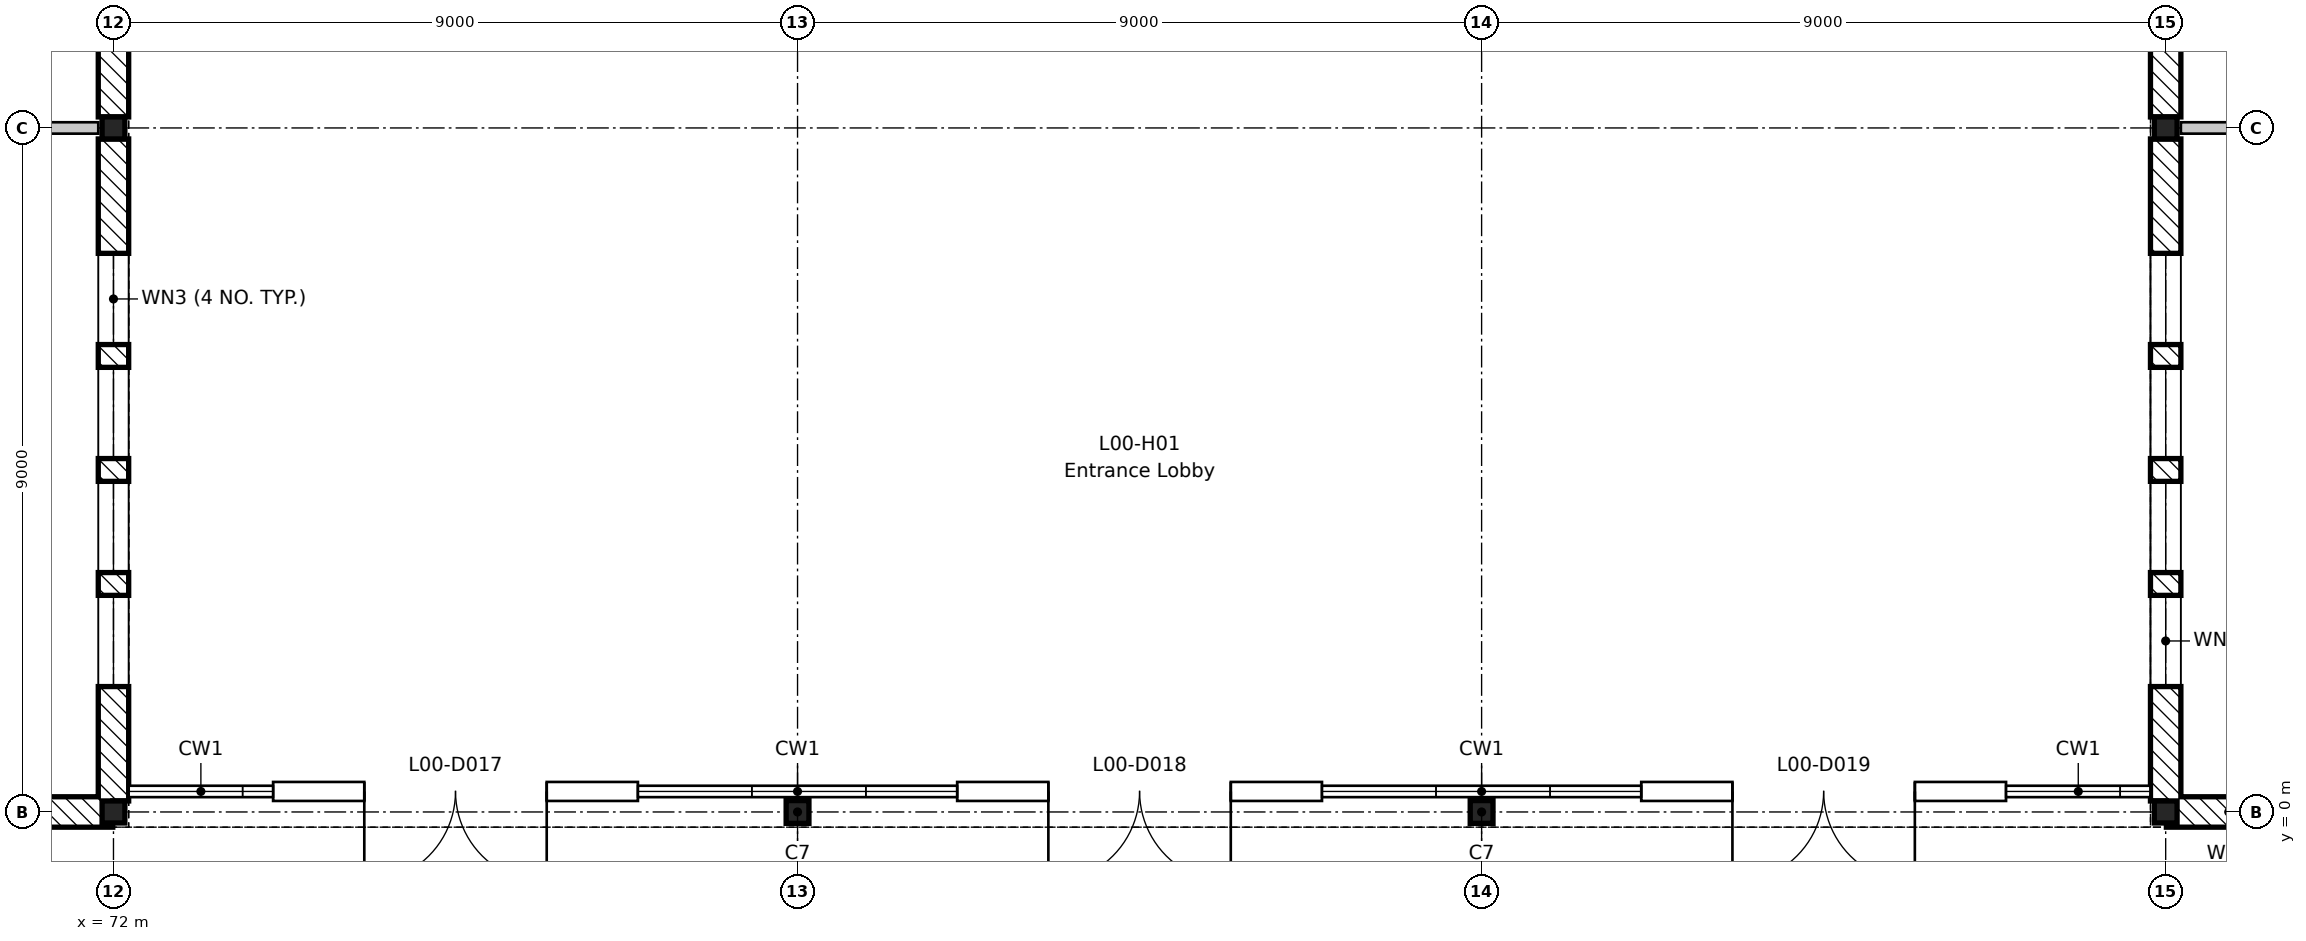
"""IFC4 building model, lengths in metres.
Left out: names, types, materials, properties, quantities, classifications, styles, units other than length and angle.
Written with IfcOpenShell. Run it as: python <this file> out.ifc"""

import sys

from ifc_helpers import new_model, si_unit, direction, frame, frame_2d, origin, origin_2d, place, context, subcontext, project, spatial, rectangle, hollow_rectangle, i_section, extrude, element, fill, save


model = new_model("IFC4")
c1 = context("Model", 3, precision=1e-05, world=origin(), true_north=direction((0.0, 1.0)))
c2 = subcontext(c1, "Body", "Model", "MODEL_VIEW")
j1 = project(units=[si_unit("LENGTHUNIT", "METRE"), si_unit("PLANEANGLEUNIT", "RADIAN")], contexts=[c1])
p1 = place(None, origin())
s1 = spatial("IfcSite", under=j1, at=p1, CompositionType="ELEMENT")
p2 = place(p1, origin())
s2 = spatial("IfcBuilding", under=s1, at=p2, CompositionType="ELEMENT")
p3 = place(p2, origin())
s3 = spatial("IfcBuildingStorey", under=s2, at=p3, CompositionType="ELEMENT", Elevation=0.0)
for number, where, z_axis, x_axis in (
    (1, (72.0, 0.0, -0.6), (0.0, 0.0, 1.0), (1.0, 0.0, 0.0)),
    (2, (72.0, 9.0, -0.6), (0.0, 0.0, 1.0), (1.0, 0.0, 0.0)),
    (3, (99.0, 0.0, -0.6), (0.0, 0.0, 1.0), (1.0, 0.0, 0.0)),
    (4, (99.0, 9.0, -0.6), (0.0, 0.0, 1.0), (1.0, 0.0, 0.0)),
):
    element("IfcColumn", number, at=place(p3, frame(where, z_axis=z_axis, x_axis=x_axis)), inside=s3, PredefinedType="COLUMN", context=c2, shape_type="SweptSolid", body=[
        extrude(i_section(OverallWidth=0.3, OverallDepth=0.29, WebThickness=0.009, FlangeThickness=0.014, FilletRadius=0.027, at=origin_2d()), origin(), (0.0, 0.0, 1.0), 5.8),
    ])
for number, where, z_axis, x_axis in (
    (5, (81.0, 0.0, -0.6), (0.0, 0.0, 1.0), (1.0, 0.0, 0.0)),
    (6, (90.0, 0.0, -0.6), (0.0, 0.0, 1.0), (1.0, 0.0, 0.0)),
):
    element("IfcColumn", number, at=place(p3, frame(where, z_axis=z_axis, x_axis=x_axis)), inside=s3, PredefinedType="COLUMN", context=c2, shape_type="SweptSolid", body=[
        extrude(hollow_rectangle(XDim=0.3, YDim=0.3, WallThickness=0.016, at=origin_2d()), origin(), (0.0, 0.0, 1.0), 5.4),
    ])
p4 = place(p3, frame((72.0, 8.855, 0.0), z_axis=(0.0, 0.0, 1.0), x_axis=(0.0, -1.0, 0.0)))
e7 = element("IfcWall", 7, at=p4, inside=s3, PredefinedType="STANDARD", context=c2, shape_type="SweptSolid", body=[
    extrude(rectangle(XDim=8.71, YDim=0.4, at=frame_2d((4.355, 0.0))), origin(), (0.0, 0.0, 1.0), 4.8),
])
p5 = place(p4, frame((6.005, 0.0, 0.6)))
e8 = element("IfcOpeningElement", 8, at=p5, cuts=e7, PredefinedType="OPENING", context=c2, shape_type="SweptSolid", body=[
    extrude(rectangle(XDim=1.2, YDim=3.9, at=frame_2d((0.6, 1.95))), frame((0.0, 0.21, 0.0), z_axis=(0.0, -1.0, 0.0), x_axis=(1.0, 0.0, 0.0)), (0.0, 0.0, 1.0), 0.42),
])
p6 = place(p4, frame((4.505, 0.0, 0.6)))
e9 = element("IfcOpeningElement", 9, at=p6, cuts=e7, PredefinedType="OPENING", context=c2, shape_type="SweptSolid", body=[
    extrude(rectangle(XDim=1.2, YDim=3.9, at=frame_2d((0.6, 1.95))), frame((0.0, 0.21, 0.0), z_axis=(0.0, -1.0, 0.0), x_axis=(1.0, 0.0, 0.0)), (0.0, 0.0, 1.0), 0.42),
])
p7 = place(p4, frame((3.005, 0.0, 0.6)))
e10 = element("IfcOpeningElement", 10, at=p7, cuts=e7, PredefinedType="OPENING", context=c2, shape_type="SweptSolid", body=[
    extrude(rectangle(XDim=1.2, YDim=3.9, at=frame_2d((0.6, 1.95))), frame((0.0, 0.21, 0.0), z_axis=(0.0, -1.0, 0.0), x_axis=(1.0, 0.0, 0.0)), (0.0, 0.0, 1.0), 0.42),
])
p8 = place(p4, frame((1.505, 0.0, 0.6)))
e11 = element("IfcOpeningElement", 11, at=p8, cuts=e7, PredefinedType="OPENING", context=c2, shape_type="SweptSolid", body=[
    extrude(rectangle(XDim=1.2, YDim=3.9, at=frame_2d((0.6, 1.95))), frame((0.0, 0.21, 0.0), z_axis=(0.0, -1.0, 0.0), x_axis=(1.0, 0.0, 0.0)), (0.0, 0.0, 1.0), 0.42),
])
p9 = place(p3, frame((72.0, 17.855, 0.0), z_axis=(0.0, 0.0, 1.0), x_axis=(0.0, -1.0, 0.0)))
e12 = element("IfcWall", 12, at=p9, inside=s3, PredefinedType="STANDARD", context=c2, shape_type="SweptSolid", body=[
    extrude(rectangle(XDim=8.71, YDim=0.4, at=frame_2d((4.355, 0.0))), origin(), (0.0, 0.0, 1.0), 4.8),
])
p10 = place(p9, frame((6.005, 0.0, 0.6)))
e13 = element("IfcOpeningElement", 13, at=p10, cuts=e12, PredefinedType="OPENING", context=c2, shape_type="SweptSolid", body=[
    extrude(rectangle(XDim=1.2, YDim=3.9, at=frame_2d((0.6, 1.95))), frame((0.0, 0.21, 0.0), z_axis=(0.0, -1.0, 0.0), x_axis=(1.0, 0.0, 0.0)), (0.0, 0.0, 1.0), 0.42),
])
p11 = place(p9, frame((4.505, 0.0, 0.6)))
e14 = element("IfcOpeningElement", 14, at=p11, cuts=e12, PredefinedType="OPENING", context=c2, shape_type="SweptSolid", body=[
    extrude(rectangle(XDim=1.2, YDim=3.9, at=frame_2d((0.6, 1.95))), frame((0.0, 0.21, 0.0), z_axis=(0.0, -1.0, 0.0), x_axis=(1.0, 0.0, 0.0)), (0.0, 0.0, 1.0), 0.42),
])
p12 = place(p9, frame((3.005, 0.0, 0.6)))
e15 = element("IfcOpeningElement", 15, at=p12, cuts=e12, PredefinedType="OPENING", context=c2, shape_type="SweptSolid", body=[
    extrude(rectangle(XDim=1.2, YDim=3.9, at=frame_2d((0.6, 1.95))), frame((0.0, 0.21, 0.0), z_axis=(0.0, -1.0, 0.0), x_axis=(1.0, 0.0, 0.0)), (0.0, 0.0, 1.0), 0.42),
])
p13 = place(p9, frame((1.505, 0.0, 0.6)))
e16 = element("IfcOpeningElement", 16, at=p13, cuts=e12, PredefinedType="OPENING", context=c2, shape_type="SweptSolid", body=[
    extrude(rectangle(XDim=1.2, YDim=3.9, at=frame_2d((0.6, 1.95))), frame((0.0, 0.21, 0.0), z_axis=(0.0, -1.0, 0.0), x_axis=(1.0, 0.0, 0.0)), (0.0, 0.0, 1.0), 0.42),
])
p14 = place(p3, frame((71.991, 0.0, 0.0), z_axis=(0.0, 0.0, 1.0), x_axis=(-1.0, 0.0, 0.0)))
e17 = element("IfcWall", 17, at=p14, inside=s3, PredefinedType="STANDARD", context=c2, shape_type="SweptSolid", body=[
    extrude(rectangle(XDim=7.481, YDim=0.4, at=frame_2d((3.741, 0.0))), origin(), (0.0, 0.0, 1.0), 4.87),
])
p15 = place(p14, frame((4.641, 0.0, 0.6)))
e18 = element("IfcOpeningElement", 18, at=p15, cuts=e17, PredefinedType="OPENING", context=c2, shape_type="SweptSolid", body=[
    extrude(rectangle(XDim=1.2, YDim=3.9, at=frame_2d((0.6, 1.95))), frame((0.0, 0.21, 0.0), z_axis=(0.0, -1.0, 0.0), x_axis=(1.0, 0.0, 0.0)), (0.0, 0.0, 1.0), 0.42),
])
p16 = place(p14, frame((3.141, 0.0, 0.6)))
e19 = element("IfcOpeningElement", 19, at=p16, cuts=e17, PredefinedType="OPENING", context=c2, shape_type="SweptSolid", body=[
    extrude(rectangle(XDim=1.2, YDim=3.9, at=frame_2d((0.6, 1.95))), frame((0.0, 0.21, 0.0), z_axis=(0.0, -1.0, 0.0), x_axis=(1.0, 0.0, 0.0)), (0.0, 0.0, 1.0), 0.42),
])
p17 = place(p14, frame((1.641, 0.0, 0.6)))
e20 = element("IfcOpeningElement", 20, at=p17, cuts=e17, PredefinedType="OPENING", context=c2, shape_type="SweptSolid", body=[
    extrude(rectangle(XDim=1.2, YDim=3.9, at=frame_2d((0.6, 1.95))), frame((0.0, 0.21, 0.0), z_axis=(0.0, -1.0, 0.0), x_axis=(1.0, 0.0, 0.0)), (0.0, 0.0, 1.0), 0.42),
])
p18 = place(p3, frame((99.0, 0.145, 0.0), z_axis=(0.0, 0.0, 1.0), x_axis=(0.0, 1.0, 0.0)))
e21 = element("IfcWall", 21, at=p18, inside=s3, PredefinedType="STANDARD", context=c2, shape_type="SweptSolid", body=[
    extrude(rectangle(XDim=8.71, YDim=0.4, at=frame_2d((4.355, 0.0))), origin(), (0.0, 0.0, 1.0), 4.8),
])
p19 = place(p18, frame((1.505, 0.0, 0.6)))
e22 = element("IfcOpeningElement", 22, at=p19, cuts=e21, PredefinedType="OPENING", context=c2, shape_type="SweptSolid", body=[
    extrude(rectangle(XDim=1.2, YDim=3.9, at=frame_2d((0.6, 1.95))), frame((0.0, 0.21, 0.0), z_axis=(0.0, -1.0, 0.0), x_axis=(1.0, 0.0, 0.0)), (0.0, 0.0, 1.0), 0.42),
])
p20 = place(p18, frame((3.005, 0.0, 0.6)))
e23 = element("IfcOpeningElement", 23, at=p20, cuts=e21, PredefinedType="OPENING", context=c2, shape_type="SweptSolid", body=[
    extrude(rectangle(XDim=1.2, YDim=3.9, at=frame_2d((0.6, 1.95))), frame((0.0, 0.21, 0.0), z_axis=(0.0, -1.0, 0.0), x_axis=(1.0, 0.0, 0.0)), (0.0, 0.0, 1.0), 0.42),
])
p21 = place(p18, frame((4.505, 0.0, 0.6)))
e24 = element("IfcOpeningElement", 24, at=p21, cuts=e21, PredefinedType="OPENING", context=c2, shape_type="SweptSolid", body=[
    extrude(rectangle(XDim=1.2, YDim=3.9, at=frame_2d((0.6, 1.95))), frame((0.0, 0.21, 0.0), z_axis=(0.0, -1.0, 0.0), x_axis=(1.0, 0.0, 0.0)), (0.0, 0.0, 1.0), 0.42),
])
p22 = place(p18, frame((6.005, 0.0, 0.6)))
e25 = element("IfcOpeningElement", 25, at=p22, cuts=e21, PredefinedType="OPENING", context=c2, shape_type="SweptSolid", body=[
    extrude(rectangle(XDim=1.2, YDim=3.9, at=frame_2d((0.6, 1.95))), frame((0.0, 0.21, 0.0), z_axis=(0.0, -1.0, 0.0), x_axis=(1.0, 0.0, 0.0)), (0.0, 0.0, 1.0), 0.42),
])
p23 = place(p3, frame((99.0, 9.145, 0.0), z_axis=(0.0, 0.0, 1.0), x_axis=(0.0, 1.0, 0.0)))
e26 = element("IfcWall", 26, at=p23, inside=s3, PredefinedType="STANDARD", context=c2, shape_type="SweptSolid", body=[
    extrude(rectangle(XDim=8.71, YDim=0.4, at=frame_2d((4.355, 0.0))), origin(), (0.0, 0.0, 1.0), 4.8),
])
p24 = place(p23, frame((1.505, 0.0, 0.6)))
e27 = element("IfcOpeningElement", 27, at=p24, cuts=e26, PredefinedType="OPENING", context=c2, shape_type="SweptSolid", body=[
    extrude(rectangle(XDim=1.2, YDim=3.9, at=frame_2d((0.6, 1.95))), frame((0.0, 0.21, 0.0), z_axis=(0.0, -1.0, 0.0), x_axis=(1.0, 0.0, 0.0)), (0.0, 0.0, 1.0), 0.42),
])
p25 = place(p23, frame((3.005, 0.0, 0.6)))
e28 = element("IfcOpeningElement", 28, at=p25, cuts=e26, PredefinedType="OPENING", context=c2, shape_type="SweptSolid", body=[
    extrude(rectangle(XDim=1.2, YDim=3.9, at=frame_2d((0.6, 1.95))), frame((0.0, 0.21, 0.0), z_axis=(0.0, -1.0, 0.0), x_axis=(1.0, 0.0, 0.0)), (0.0, 0.0, 1.0), 0.42),
])
p26 = place(p23, frame((4.505, 0.0, 0.6)))
e29 = element("IfcOpeningElement", 29, at=p26, cuts=e26, PredefinedType="OPENING", context=c2, shape_type="SweptSolid", body=[
    extrude(rectangle(XDim=1.2, YDim=3.9, at=frame_2d((0.6, 1.95))), frame((0.0, 0.21, 0.0), z_axis=(0.0, -1.0, 0.0), x_axis=(1.0, 0.0, 0.0)), (0.0, 0.0, 1.0), 0.42),
])
p27 = place(p23, frame((6.005, 0.0, 0.6)))
e30 = element("IfcOpeningElement", 30, at=p27, cuts=e26, PredefinedType="OPENING", context=c2, shape_type="SweptSolid", body=[
    extrude(rectangle(XDim=1.2, YDim=3.9, at=frame_2d((0.6, 1.95))), frame((0.0, 0.21, 0.0), z_axis=(0.0, -1.0, 0.0), x_axis=(1.0, 0.0, 0.0)), (0.0, 0.0, 1.0), 0.42),
])
p28 = place(p3, frame((106.491, 0.0, 0.0), z_axis=(0.0, 0.0, 1.0), x_axis=(-1.0, 0.0, 0.0)))
e31 = element("IfcWall", 31, at=p28, inside=s3, PredefinedType="STANDARD", context=c2, shape_type="SweptSolid", body=[
    extrude(rectangle(XDim=7.481, YDim=0.4, at=frame_2d((3.741, 0.0))), origin(), (0.0, 0.0, 1.0), 4.87),
])
p29 = place(p28, frame((4.641, 0.0, 0.6)))
e32 = element("IfcOpeningElement", 32, at=p29, cuts=e31, PredefinedType="OPENING", context=c2, shape_type="SweptSolid", body=[
    extrude(rectangle(XDim=1.2, YDim=3.9, at=frame_2d((0.6, 1.95))), frame((0.0, 0.21, 0.0), z_axis=(0.0, -1.0, 0.0), x_axis=(1.0, 0.0, 0.0)), (0.0, 0.0, 1.0), 0.42),
])
p30 = place(p28, frame((3.141, 0.0, 0.6)))
e33 = element("IfcOpeningElement", 33, at=p30, cuts=e31, PredefinedType="OPENING", context=c2, shape_type="SweptSolid", body=[
    extrude(rectangle(XDim=1.2, YDim=3.9, at=frame_2d((0.6, 1.95))), frame((0.0, 0.21, 0.0), z_axis=(0.0, -1.0, 0.0), x_axis=(1.0, 0.0, 0.0)), (0.0, 0.0, 1.0), 0.42),
])
p31 = place(p28, frame((1.641, 0.0, 0.6)))
e34 = element("IfcOpeningElement", 34, at=p31, cuts=e31, PredefinedType="OPENING", context=c2, shape_type="SweptSolid", body=[
    extrude(rectangle(XDim=1.2, YDim=3.9, at=frame_2d((0.6, 1.95))), frame((0.0, 0.21, 0.0), z_axis=(0.0, -1.0, 0.0), x_axis=(1.0, 0.0, 0.0)), (0.0, 0.0, 1.0), 0.42),
])
p32 = place(p3, frame((78.9, 0.27, 0.0), z_axis=(0.0, 0.0, 1.0), x_axis=(-1.0, 0.0, 0.0)))
e35 = element("IfcWall", 35, at=p32, inside=s3, PredefinedType="STANDARD", context=c2, shape_type="SweptSolid", body=[
    extrude(rectangle(XDim=4.8, YDim=0.25, at=frame_2d((2.4, 0.0))), origin(), (0.0, 0.0, 1.0), 4.8),
])
p33 = place(p32, frame((1.2, 0.0, 0.0)))
e36 = element("IfcOpeningElement", 36, at=p33, cuts=e35, PredefinedType="OPENING", context=c2, shape_type="SweptSolid", body=[
    extrude(rectangle(XDim=2.4, YDim=2.4, at=frame_2d((1.2, 1.2))), frame((0.0, 0.135, 0.0), z_axis=(0.0, -1.0, 0.0), x_axis=(1.0, 0.0, 0.0)), (0.0, 0.0, 1.0), 0.27),
])
p34 = place(p3, frame((87.9, 0.27, 0.0), z_axis=(0.0, 0.0, 1.0), x_axis=(-1.0, 0.0, 0.0)))
e37 = element("IfcWall", 37, at=p34, inside=s3, PredefinedType="STANDARD", context=c2, shape_type="SweptSolid", body=[
    extrude(rectangle(XDim=4.8, YDim=0.25, at=frame_2d((2.4, 0.0))), origin(), (0.0, 0.0, 1.0), 4.8),
])
p35 = place(p34, frame((1.2, 0.0, 0.0)))
e38 = element("IfcOpeningElement", 38, at=p35, cuts=e37, PredefinedType="OPENING", context=c2, shape_type="SweptSolid", body=[
    extrude(rectangle(XDim=2.4, YDim=2.4, at=frame_2d((1.2, 1.2))), frame((0.0, 0.135, 0.0), z_axis=(0.0, -1.0, 0.0), x_axis=(1.0, 0.0, 0.0)), (0.0, 0.0, 1.0), 0.27),
])
p36 = place(p3, frame((96.9, 0.27, 0.0), z_axis=(0.0, 0.0, 1.0), x_axis=(-1.0, 0.0, 0.0)))
e39 = element("IfcWall", 39, at=p36, inside=s3, PredefinedType="STANDARD", context=c2, shape_type="SweptSolid", body=[
    extrude(rectangle(XDim=4.8, YDim=0.25, at=frame_2d((2.4, 0.0))), origin(), (0.0, 0.0, 1.0), 4.8),
])
p37 = place(p36, frame((1.2, 0.0, 0.0)))
e40 = element("IfcOpeningElement", 40, at=p37, cuts=e39, PredefinedType="OPENING", context=c2, shape_type="SweptSolid", body=[
    extrude(rectangle(XDim=2.4, YDim=2.4, at=frame_2d((1.2, 1.2))), frame((0.0, 0.135, 0.0), z_axis=(0.0, -1.0, 0.0), x_axis=(1.0, 0.0, 0.0)), (0.0, 0.0, 1.0), 0.27),
])
for number, where, z_axis, x_axis in (
    (41, (64.575, 9.0, 0.0), (0.0, 0.0, 1.0), (1.0, 0.0, 0.0)),
    (42, (99.2, 9.0, 0.0), (0.0, 0.0, 1.0), (1.0, 0.0, 0.0)),
):
    element("IfcWall", number, at=place(p3, frame(where, z_axis=z_axis, x_axis=x_axis)), inside=s3, PredefinedType="PARTITIONING", context=c2, shape_type="SweptSolid", body=[
        extrude(rectangle(XDim=7.225, YDim=0.15, at=frame_2d((3.613, 0.0))), origin(), (0.0, 0.0, 1.0), 4.85),
    ])
p38 = place(p5, origin())
e43 = element("IfcWindow", 43, at=p38, inside=s3, PartitioningType="SINGLE_PANEL", PredefinedType="WINDOW", context=c2, shape_type="SweptSolid", body=[
    extrude(rectangle(XDim=1.2, YDim=3.9, at=frame_2d((0.6, 1.95))), frame((0.0, 0.03, 0.0), z_axis=(0.0, -1.0, 0.0), x_axis=(1.0, 0.0, 0.0)), (0.0, 0.0, 1.0), 0.06),
])
fill(e8, e43)
p39 = place(p6, origin())
e44 = element("IfcWindow", 44, at=p39, inside=s3, PartitioningType="SINGLE_PANEL", PredefinedType="WINDOW", context=c2, shape_type="SweptSolid", body=[
    extrude(rectangle(XDim=1.2, YDim=3.9, at=frame_2d((0.6, 1.95))), frame((0.0, 0.03, 0.0), z_axis=(0.0, -1.0, 0.0), x_axis=(1.0, 0.0, 0.0)), (0.0, 0.0, 1.0), 0.06),
])
fill(e9, e44)
p40 = place(p7, origin())
e45 = element("IfcWindow", 45, at=p40, inside=s3, PartitioningType="SINGLE_PANEL", PredefinedType="WINDOW", context=c2, shape_type="SweptSolid", body=[
    extrude(rectangle(XDim=1.2, YDim=3.9, at=frame_2d((0.6, 1.95))), frame((0.0, 0.03, 0.0), z_axis=(0.0, -1.0, 0.0), x_axis=(1.0, 0.0, 0.0)), (0.0, 0.0, 1.0), 0.06),
])
fill(e10, e45)
p41 = place(p8, origin())
e46 = element("IfcWindow", 46, at=p41, inside=s3, PartitioningType="SINGLE_PANEL", PredefinedType="WINDOW", context=c2, shape_type="SweptSolid", body=[
    extrude(rectangle(XDim=1.2, YDim=3.9, at=frame_2d((0.6, 1.95))), frame((0.0, 0.03, 0.0), z_axis=(0.0, -1.0, 0.0), x_axis=(1.0, 0.0, 0.0)), (0.0, 0.0, 1.0), 0.06),
])
fill(e11, e46)
p42 = place(p19, origin())
e47 = element("IfcWindow", 47, at=p42, inside=s3, PartitioningType="SINGLE_PANEL", PredefinedType="WINDOW", context=c2, shape_type="SweptSolid", body=[
    extrude(rectangle(XDim=1.2, YDim=3.9, at=frame_2d((0.6, 1.95))), frame((0.0, 0.03, 0.0), z_axis=(0.0, -1.0, 0.0), x_axis=(1.0, 0.0, 0.0)), (0.0, 0.0, 1.0), 0.06),
])
fill(e22, e47)
p43 = place(p20, origin())
e48 = element("IfcWindow", 48, at=p43, inside=s3, PartitioningType="SINGLE_PANEL", PredefinedType="WINDOW", context=c2, shape_type="SweptSolid", body=[
    extrude(rectangle(XDim=1.2, YDim=3.9, at=frame_2d((0.6, 1.95))), frame((0.0, 0.03, 0.0), z_axis=(0.0, -1.0, 0.0), x_axis=(1.0, 0.0, 0.0)), (0.0, 0.0, 1.0), 0.06),
])
fill(e23, e48)
p44 = place(p21, origin())
e49 = element("IfcWindow", 49, at=p44, inside=s3, PartitioningType="SINGLE_PANEL", PredefinedType="WINDOW", context=c2, shape_type="SweptSolid", body=[
    extrude(rectangle(XDim=1.2, YDim=3.9, at=frame_2d((0.6, 1.95))), frame((0.0, 0.03, 0.0), z_axis=(0.0, -1.0, 0.0), x_axis=(1.0, 0.0, 0.0)), (0.0, 0.0, 1.0), 0.06),
])
fill(e24, e49)
p45 = place(p22, origin())
e50 = element("IfcWindow", 50, at=p45, inside=s3, PartitioningType="SINGLE_PANEL", PredefinedType="WINDOW", context=c2, shape_type="SweptSolid", body=[
    extrude(rectangle(XDim=1.2, YDim=3.9, at=frame_2d((0.6, 1.95))), frame((0.0, 0.03, 0.0), z_axis=(0.0, -1.0, 0.0), x_axis=(1.0, 0.0, 0.0)), (0.0, 0.0, 1.0), 0.06),
])
fill(e25, e50)
p46 = place(p33, origin())
e51 = element("IfcDoor", 51, at=p46, inside=s3, OperationType="DOUBLE_DOOR_SINGLE_SWING", PredefinedType="DOOR", context=c2, shape_type="SweptSolid", body=[
    extrude(rectangle(XDim=2.4, YDim=2.4, at=frame_2d((1.2, 1.2))), frame((0.0, 0.025, 0.0), z_axis=(0.0, -1.0, 0.0), x_axis=(1.0, 0.0, 0.0)), (0.0, 0.0, 1.0), 0.05),
])
fill(e36, e51)
p47 = place(p35, origin())
e52 = element("IfcDoor", 52, at=p47, inside=s3, OperationType="DOUBLE_DOOR_SINGLE_SWING", PredefinedType="DOOR", context=c2, shape_type="SweptSolid", body=[
    extrude(rectangle(XDim=2.4, YDim=2.4, at=frame_2d((1.2, 1.2))), frame((0.0, 0.025, 0.0), z_axis=(0.0, -1.0, 0.0), x_axis=(1.0, 0.0, 0.0)), (0.0, 0.0, 1.0), 0.05),
])
fill(e38, e52)
p48 = place(p37, origin())
e53 = element("IfcDoor", 53, at=p48, inside=s3, OperationType="DOUBLE_DOOR_SINGLE_SWING", PredefinedType="DOOR", context=c2, shape_type="SweptSolid", body=[
    extrude(rectangle(XDim=2.4, YDim=2.4, at=frame_2d((1.2, 1.2))), frame((0.0, 0.025, 0.0), z_axis=(0.0, -1.0, 0.0), x_axis=(1.0, 0.0, 0.0)), (0.0, 0.0, 1.0), 0.05),
])
fill(e40, e53)
save(model, sys.argv[1])
